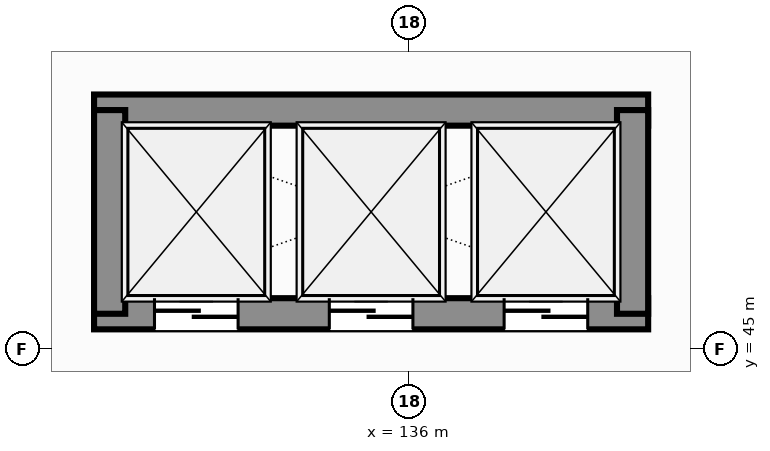
"""IFC4 building model, lengths in metres.
Left out: names, types, materials, properties, quantities, classifications, styles, units other than length and angle.
Written with IfcOpenShell. Run it as: python <this file> out.ifc"""

import sys

from ifc_helpers import new_model, si_unit, direction, frame, frame_2d, origin, place, context, subcontext, project, spatial, rectangle, extrude, element, fill, save


model = new_model("IFC4")
c1 = context("Model", 3, precision=1e-05, world=origin(), true_north=direction((0.0, 1.0)))
c2 = subcontext(c1, "Body", "Model", "MODEL_VIEW")
j1 = project(units=[si_unit("LENGTHUNIT", "METRE"), si_unit("PLANEANGLEUNIT", "RADIAN")], contexts=[c1])
p1 = place(None, origin())
s1 = spatial("IfcSite", under=j1, at=p1, CompositionType="ELEMENT")
p2 = place(p1, origin())
s2 = spatial("IfcBuilding", under=s1, at=p2, CompositionType="ELEMENT")
p3 = place(p2, origin())
s3 = spatial("IfcBuildingStorey", under=s2, at=p3, CompositionType="ELEMENT", Elevation=0.0)
p4 = place(p3, frame((131.855, 45.46, 0.0), z_axis=(0.0, 0.0, 1.0), x_axis=(1.0, 0.0, 0.0)))
e1 = element("IfcWall", 1, at=p4, inside=s3, PredefinedType="SHEAR", context=c2, shape_type="SweptSolid", body=[
    extrude(rectangle(XDim=7.29, YDim=0.41, at=frame_2d((3.645, 0.0))), origin(), (0.0, 0.0, 1.0), 6.0),
])
p5 = place(p4, frame((0.795, 0.0, 0.0)))
e2 = element("IfcOpeningElement", 2, at=p5, cuts=e1, PredefinedType="OPENING", context=c2, shape_type="SweptSolid", body=[
    extrude(rectangle(XDim=1.1, YDim=2.2, at=frame_2d((0.55, 1.1))), frame((0.0, 0.215, 0.0), z_axis=(0.0, -1.0, 0.0), x_axis=(1.0, 0.0, 0.0)), (0.0, 0.0, 1.0), 0.43),
])
p6 = place(p4, frame((3.095, 0.0, 0.0)))
e3 = element("IfcOpeningElement", 3, at=p6, cuts=e1, PredefinedType="OPENING", context=c2, shape_type="SweptSolid", body=[
    extrude(rectangle(XDim=1.1, YDim=2.2, at=frame_2d((0.55, 1.1))), frame((0.0, 0.215, 0.0), z_axis=(0.0, -1.0, 0.0), x_axis=(1.0, 0.0, 0.0)), (0.0, 0.0, 1.0), 0.43),
])
p7 = place(p4, frame((5.395, 0.0, 0.0)))
e4 = element("IfcOpeningElement", 4, at=p7, cuts=e1, PredefinedType="OPENING", context=c2, shape_type="SweptSolid", body=[
    extrude(rectangle(XDim=1.1, YDim=2.2, at=frame_2d((0.55, 1.1))), frame((0.0, 0.215, 0.0), z_axis=(0.0, -1.0, 0.0), x_axis=(1.0, 0.0, 0.0)), (0.0, 0.0, 1.0), 0.43),
])
p8 = place(p3, frame((131.855, 48.14, 0.0), z_axis=(0.0, 0.0, 1.0), x_axis=(1.0, 0.0, 0.0)))
e5 = element("IfcWall", 5, at=p8, inside=s3, PredefinedType="SHEAR", context=c2, shape_type="SweptSolid", body=[
    extrude(rectangle(XDim=7.29, YDim=0.41, at=frame_2d((3.645, 0.0))), origin(), (0.0, 0.0, 1.0), 6.0),
])
for number, where, z_axis, x_axis in (
    (6, (132.06, 45.46, 0.0), (0.0, 0.0, 1.0), (0.0, 1.0, 0.0)),
    (7, (138.94, 45.46, 0.0), (0.0, 0.0, 1.0), (0.0, 1.0, 0.0)),
):
    element("IfcWall", number, at=place(p3, frame(where, z_axis=z_axis, x_axis=x_axis)), inside=s3, PredefinedType="SHEAR", context=c2, shape_type="SweptSolid", body=[
        extrude(rectangle(XDim=2.68, YDim=0.41, at=frame_2d((1.34, 0.0))), origin(), (0.0, 0.0, 1.0), 6.0),
    ])
p9 = place(p5, origin())
e8 = element("IfcDoor", 8, at=p9, inside=s3, OperationType="DOUBLE_DOOR_SLIDING", PredefinedType="DOOR", context=c2, shape_type="SweptSolid", body=[
    extrude(rectangle(XDim=1.1, YDim=2.2, at=frame_2d((0.55, 1.1))), frame((0.0, 0.025, 0.0), z_axis=(0.0, -1.0, 0.0), x_axis=(1.0, 0.0, 0.0)), (0.0, 0.0, 1.0), 0.05),
])
fill(e2, e8)
p10 = place(p6, origin())
e9 = element("IfcDoor", 9, at=p10, inside=s3, OperationType="DOUBLE_DOOR_SLIDING", PredefinedType="DOOR", context=c2, shape_type="SweptSolid", body=[
    extrude(rectangle(XDim=1.1, YDim=2.2, at=frame_2d((0.55, 1.1))), frame((0.0, 0.025, 0.0), z_axis=(0.0, -1.0, 0.0), x_axis=(1.0, 0.0, 0.0)), (0.0, 0.0, 1.0), 0.05),
])
fill(e3, e9)
p11 = place(p7, origin())
e10 = element("IfcDoor", 10, at=p11, inside=s3, OperationType="DOUBLE_DOOR_SLIDING", PredefinedType="DOOR", context=c2, shape_type="SweptSolid", body=[
    extrude(rectangle(XDim=1.1, YDim=2.2, at=frame_2d((0.55, 1.1))), frame((0.0, 0.025, 0.0), z_axis=(0.0, -1.0, 0.0), x_axis=(1.0, 0.0, 0.0)), (0.0, 0.0, 1.0), 0.05),
])
fill(e4, e10)
save(model, sys.argv[1])
